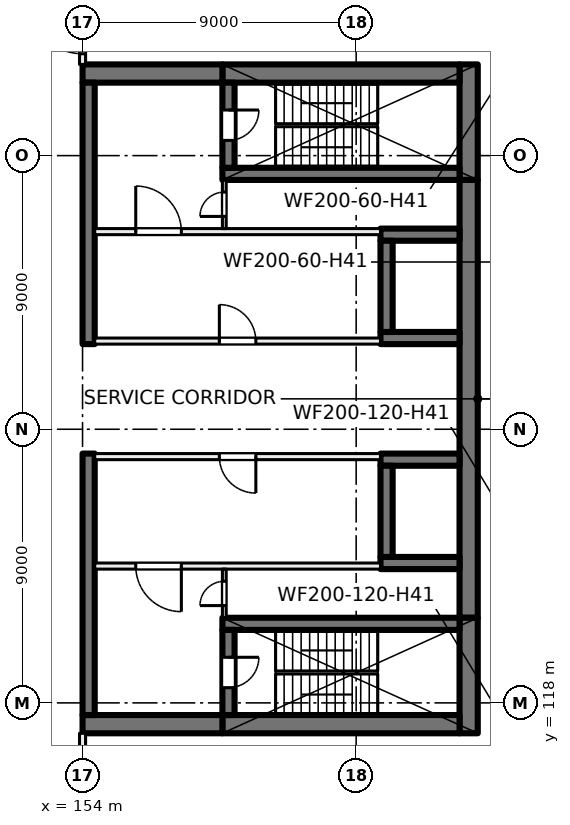
"""IFC4 building model, lengths in metres.
Left out: names, types, materials, properties, quantities, classifications, styles, units other than length and angle.
Written with IfcOpenShell. Run it as: python <this file> out.ifc"""

import sys

from ifc_helpers import new_model, si_unit, direction, frame, frame_2d, origin, place, context, subcontext, project, spatial, rectangle, extrude, element, fill, save


model = new_model("IFC4")
c1 = context("Model", 3, precision=1e-05, world=origin(), true_north=direction((0.0, 1.0)))
c2 = subcontext(c1, "Body", "Model", "MODEL_VIEW")
j1 = project(units=[si_unit("LENGTHUNIT", "METRE"), si_unit("PLANEANGLEUNIT", "RADIAN")], contexts=[c1])
p1 = place(None, origin())
s1 = spatial("IfcSite", under=j1, at=p1, CompositionType="ELEMENT")
p2 = place(p1, origin())
s2 = spatial("IfcBuilding", under=s1, at=p2, CompositionType="ELEMENT")
p3 = place(p2, frame((0.0, 0.0, -4.5)))
s3 = spatial("IfcBuildingStorey", under=s2, at=p3, CompositionType="ELEMENT", Elevation=-4.5)
p4 = place(p3, frame((166.7, 139.0, 0.0), z_axis=(0.0, 0.0, 1.0), x_axis=(0.0, -1.0, 0.0)))
e1 = element("IfcWall", 1, at=p4, inside=s3, PredefinedType="SHEAR", context=c2, shape_type="SweptSolid", body=[
    extrude(rectangle(XDim=3.8, YDim=0.6, at=frame_2d((1.9, 0.0))), origin(), (0.0, 0.0, 1.0), 4.5),
])
p5 = place(p3, frame((166.7, 135.2, 0.0), z_axis=(0.0, 0.0, 1.0), x_axis=(0.0, -1.0, 0.0)))
e2 = element("IfcWall", 2, at=p5, inside=s3, PredefinedType="SHEAR", context=c2, shape_type="SweptSolid", body=[
    extrude(rectangle(XDim=14.4, YDim=0.6, at=frame_2d((7.2, 0.0))), origin(), (0.0, 0.0, 1.0), 4.5),
])
p6 = place(p3, frame((166.7, 120.8, 0.0), z_axis=(0.0, 0.0, 1.0), x_axis=(0.0, -1.0, 0.0)))
e3 = element("IfcWall", 3, at=p6, inside=s3, PredefinedType="SHEAR", context=c2, shape_type="SweptSolid", body=[
    extrude(rectangle(XDim=3.8, YDim=0.6, at=frame_2d((1.9, 0.0))), origin(), (0.0, 0.0, 1.0), 4.5),
])
for number, where, z_axis, x_axis in (
    (4, (166.4, 138.7, 0.0), (0.0, 0.0, 1.0), (-1.0, 0.0, 0.0)),
    (5, (166.4, 117.3, 0.0), (0.0, 0.0, 1.0), (-1.0, 0.0, 0.0)),
):
    element("IfcWall", number, at=place(p3, frame(where, z_axis=z_axis, x_axis=x_axis)), inside=s3, PredefinedType="SHEAR", context=c2, shape_type="SweptSolid", body=[
        extrude(rectangle(XDim=7.8, YDim=0.6, at=frame_2d((3.9, 0.0))), origin(), (0.0, 0.0, 1.0), 4.5),
    ])
for number, where, z_axis, x_axis in (
    (6, (158.6, 138.7, 0.0), (0.0, 0.0, 1.0), (-1.0, 0.0, 0.0)),
    (7, (158.6, 117.3, 0.0), (0.0, 0.0, 1.0), (-1.0, 0.0, 0.0)),
):
    element("IfcWall", number, at=place(p3, frame(where, z_axis=z_axis, x_axis=x_axis)), inside=s3, PredefinedType="SHEAR", context=c2, shape_type="SweptSolid", body=[
        extrude(rectangle(XDim=4.6, YDim=0.6, at=frame_2d((2.3, 0.0))), origin(), (0.0, 0.0, 1.0), 4.5),
    ])
p7 = place(p3, frame((166.4, 135.4, 0.0), z_axis=(0.0, 0.0, 1.0), x_axis=(-1.0, 0.0, 0.0)))
e8 = element("IfcWall", 8, at=p7, inside=s3, PredefinedType="SHEAR", context=c2, shape_type="SweptSolid", body=[
    extrude(rectangle(XDim=7.8, YDim=0.4, at=frame_2d((3.9, 0.0))), origin(), (0.0, 0.0, 1.0), 4.5),
])
p8 = place(p3, frame((158.8, 138.4, 0.0), z_axis=(0.0, 0.0, 1.0), x_axis=(0.0, -1.0, 0.0)))
e9 = element("IfcWall", 9, at=p8, inside=s3, PredefinedType="SHEAR", context=c2, shape_type="SweptSolid", body=[
    extrude(rectangle(XDim=2.8, YDim=0.4, at=frame_2d((1.4, 0.0))), origin(), (0.0, 0.0, 1.0), 4.5),
])
p9 = place(p8, frame((0.9, 0.0, 0.0)))
e10 = element("IfcOpeningElement", 10, at=p9, cuts=e9, PredefinedType="OPENING", context=c2, shape_type="SweptSolid", body=[
    extrude(rectangle(XDim=1.0, YDim=2.1, at=frame_2d((0.5, 1.05))), frame((0.0, 0.21, 0.0), z_axis=(0.0, -1.0, 0.0), x_axis=(1.0, 0.0, 0.0)), (0.0, 0.0, 1.0), 0.42),
])
p10 = place(p3, frame((166.4, 120.6, 0.0), z_axis=(0.0, 0.0, 1.0), x_axis=(-1.0, 0.0, 0.0)))
e11 = element("IfcWall", 11, at=p10, inside=s3, PredefinedType="SHEAR", context=c2, shape_type="SweptSolid", body=[
    extrude(rectangle(XDim=7.8, YDim=0.4, at=frame_2d((3.9, 0.0))), origin(), (0.0, 0.0, 1.0), 4.5),
])
p11 = place(p3, frame((158.8, 120.4, 0.0), z_axis=(0.0, 0.0, 1.0), x_axis=(0.0, -1.0, 0.0)))
e12 = element("IfcWall", 12, at=p11, inside=s3, PredefinedType="SHEAR", context=c2, shape_type="SweptSolid", body=[
    extrude(rectangle(XDim=2.8, YDim=0.4, at=frame_2d((1.4, 0.0))), origin(), (0.0, 0.0, 1.0), 4.5),
])
p12 = place(p11, frame((0.9, 0.0, 0.0)))
e13 = element("IfcOpeningElement", 13, at=p12, cuts=e12, PredefinedType="OPENING", context=c2, shape_type="SweptSolid", body=[
    extrude(rectangle(XDim=1.0, YDim=2.1, at=frame_2d((0.5, 1.05))), frame((0.0, 0.21, 0.0), z_axis=(0.0, -1.0, 0.0), x_axis=(1.0, 0.0, 0.0)), (0.0, 0.0, 1.0), 0.42),
])
for number, where, z_axis, x_axis in (
    (14, (166.4, 130.0, 0.0), (0.0, 0.0, 1.0), (-1.0, 0.0, 0.0)),
    (15, (166.4, 133.4, 0.0), (0.0, 0.0, 1.0), (-1.0, 0.0, 0.0)),
):
    element("IfcWall", number, at=place(p3, frame(where, z_axis=z_axis, x_axis=x_axis)), inside=s3, PredefinedType="SHEAR", context=c2, shape_type="SweptSolid", body=[
        extrude(rectangle(XDim=2.6, YDim=0.4, at=frame_2d((1.3, 0.0))), origin(), (0.0, 0.0, 1.0), 4.5),
    ])
p13 = place(p3, frame((164.0, 133.2, 0.0), z_axis=(0.0, 0.0, 1.0), x_axis=(0.0, -1.0, 0.0)))
e16 = element("IfcWall", 16, at=p13, inside=s3, PredefinedType="SHEAR", context=c2, shape_type="SweptSolid", body=[
    extrude(rectangle(XDim=3.0, YDim=0.4, at=frame_2d((1.5, 0.0))), origin(), (0.0, 0.0, 1.0), 4.5),
])
for number, where, z_axis, x_axis in (
    (17, (166.4, 126.0, 0.0), (0.0, 0.0, 1.0), (-1.0, 0.0, 0.0)),
    (18, (166.4, 122.6, 0.0), (0.0, 0.0, 1.0), (-1.0, 0.0, 0.0)),
):
    element("IfcWall", number, at=place(p3, frame(where, z_axis=z_axis, x_axis=x_axis)), inside=s3, PredefinedType="SHEAR", context=c2, shape_type="SweptSolid", body=[
        extrude(rectangle(XDim=2.6, YDim=0.4, at=frame_2d((1.3, 0.0))), origin(), (0.0, 0.0, 1.0), 4.5),
    ])
p14 = place(p3, frame((164.0, 125.8, 0.0), z_axis=(0.0, 0.0, 1.0), x_axis=(0.0, -1.0, 0.0)))
e19 = element("IfcWall", 19, at=p14, inside=s3, PredefinedType="SHEAR", context=c2, shape_type="SweptSolid", body=[
    extrude(rectangle(XDim=3.0, YDim=0.4, at=frame_2d((1.5, 0.0))), origin(), (0.0, 0.0, 1.0), 4.5),
])
for number, where, z_axis, x_axis in (
    (20, (154.2, 138.4, 0.0), (0.0, 0.0, 1.0), (0.0, -1.0, 0.0)),
    (21, (154.2, 126.2, 0.0), (0.0, 0.0, 1.0), (0.0, -1.0, 0.0)),
):
    element("IfcWall", number, at=place(p3, frame(where, z_axis=z_axis, x_axis=x_axis)), inside=s3, PredefinedType="SHEAR", context=c2, shape_type="SweptSolid", body=[
        extrude(rectangle(XDim=8.6, YDim=0.4, at=frame_2d((4.3, 0.0))), origin(), (0.0, 0.0, 1.0), 4.5),
    ])
p15 = place(p3, frame((163.8, 126.1, 0.0), z_axis=(0.0, 0.0, 1.0), x_axis=(-1.0, 0.0, 0.0)))
e22 = element("IfcWall", 22, at=p15, inside=s3, PredefinedType="PARTITIONING", context=c2, shape_type="SweptSolid", body=[
    extrude(rectangle(XDim=9.4, YDim=0.2, at=frame_2d((4.7, 0.0))), origin(), (0.0, 0.0, 1.0), 4.1),
])
p16 = place(p15, frame((4.1, 0.0, 0.0)))
e23 = element("IfcOpeningElement", 23, at=p16, cuts=e22, PredefinedType="OPENING", context=c2, shape_type="SweptSolid", body=[
    extrude(rectangle(XDim=1.2, YDim=2.1, at=frame_2d((0.6, 1.05))), frame((0.0, 0.11, 0.0), z_axis=(0.0, -1.0, 0.0), x_axis=(1.0, 0.0, 0.0)), (0.0, 0.0, 1.0), 0.22),
])
p17 = place(p3, frame((163.8, 122.5, 0.0), z_axis=(0.0, 0.0, 1.0), x_axis=(-1.0, 0.0, 0.0)))
e24 = element("IfcWall", 24, at=p17, inside=s3, PredefinedType="PARTITIONING", context=c2, shape_type="SweptSolid", body=[
    extrude(rectangle(XDim=9.4, YDim=0.2, at=frame_2d((4.7, 0.0))), origin(), (0.0, 0.0, 1.0), 4.1),
])
p18 = place(p17, frame((6.55, 0.0, 0.0)))
e25 = element("IfcOpeningElement", 25, at=p18, cuts=e24, PredefinedType="OPENING", context=c2, shape_type="SweptSolid", body=[
    extrude(rectangle(XDim=1.5, YDim=2.1, at=frame_2d((0.75, 1.05))), frame((0.0, 0.11, 0.0), z_axis=(0.0, -1.0, 0.0), x_axis=(1.0, 0.0, 0.0)), (0.0, 0.0, 1.0), 0.22),
])
p19 = place(p3, frame((158.663, 120.8, 0.0), z_axis=(0.0, 0.0, 1.0), x_axis=(0.0, 1.0, 0.0)))
e26 = element("IfcWall", 26, at=p19, inside=s3, PredefinedType="PARTITIONING", context=c2, shape_type="SweptSolid", body=[
    extrude(rectangle(XDim=1.6, YDim=0.125, at=frame_2d((0.8, 0.0))), origin(), (0.0, 0.0, 1.0), 4.1),
])
p20 = place(p19, frame((0.4, 0.0, 0.0)))
e27 = element("IfcOpeningElement", 27, at=p20, cuts=e26, PredefinedType="OPENING", context=c2, shape_type="SweptSolid", body=[
    extrude(rectangle(XDim=0.8, YDim=2.1, at=frame_2d((0.4, 1.05))), frame((0.0, 0.073, 0.0), z_axis=(0.0, -1.0, 0.0), x_axis=(1.0, 0.0, 0.0)), (0.0, 0.0, 1.0), 0.145),
])
p21 = place(p3, frame((154.4, 129.9, 0.0), z_axis=(0.0, 0.0, 1.0), x_axis=(1.0, 0.0, 0.0)))
e28 = element("IfcWall", 28, at=p21, inside=s3, PredefinedType="PARTITIONING", context=c2, shape_type="SweptSolid", body=[
    extrude(rectangle(XDim=9.4, YDim=0.2, at=frame_2d((4.7, 0.0))), origin(), (0.0, 0.0, 1.0), 4.1),
])
p22 = place(p21, frame((4.1, 0.0, 0.0)))
e29 = element("IfcOpeningElement", 29, at=p22, cuts=e28, PredefinedType="OPENING", context=c2, shape_type="SweptSolid", body=[
    extrude(rectangle(XDim=1.2, YDim=2.1, at=frame_2d((0.6, 1.05))), frame((0.0, 0.11, 0.0), z_axis=(0.0, -1.0, 0.0), x_axis=(1.0, 0.0, 0.0)), (0.0, 0.0, 1.0), 0.22),
])
p23 = place(p3, frame((154.4, 133.5, 0.0), z_axis=(0.0, 0.0, 1.0), x_axis=(1.0, 0.0, 0.0)))
e30 = element("IfcWall", 30, at=p23, inside=s3, PredefinedType="PARTITIONING", context=c2, shape_type="SweptSolid", body=[
    extrude(rectangle(XDim=9.4, YDim=0.2, at=frame_2d((4.7, 0.0))), origin(), (0.0, 0.0, 1.0), 4.1),
])
p24 = place(p23, frame((1.35, 0.0, 0.0)))
e31 = element("IfcOpeningElement", 31, at=p24, cuts=e30, PredefinedType="OPENING", context=c2, shape_type="SweptSolid", body=[
    extrude(rectangle(XDim=1.5, YDim=2.1, at=frame_2d((0.75, 1.05))), frame((0.0, 0.11, 0.0), z_axis=(0.0, -1.0, 0.0), x_axis=(1.0, 0.0, 0.0)), (0.0, 0.0, 1.0), 0.22),
])
p25 = place(p3, frame((158.663, 133.6, 0.0), z_axis=(0.0, 0.0, 1.0), x_axis=(0.0, 1.0, 0.0)))
e32 = element("IfcWall", 32, at=p25, inside=s3, PredefinedType="PARTITIONING", context=c2, shape_type="SweptSolid", body=[
    extrude(rectangle(XDim=1.6, YDim=0.125, at=frame_2d((0.8, 0.0))), origin(), (0.0, 0.0, 1.0), 4.1),
])
p26 = place(p25, frame((0.4, 0.0, 0.0)))
e33 = element("IfcOpeningElement", 33, at=p26, cuts=e32, PredefinedType="OPENING", context=c2, shape_type="SweptSolid", body=[
    extrude(rectangle(XDim=0.8, YDim=2.1, at=frame_2d((0.4, 1.05))), frame((0.0, 0.073, 0.0), z_axis=(0.0, -1.0, 0.0), x_axis=(1.0, 0.0, 0.0)), (0.0, 0.0, 1.0), 0.145),
])
p27 = place(p3, frame((154.0, 114.5, 0.0), z_axis=(0.0, 0.0, 1.0), x_axis=(0.0, 1.0, 0.0)))
e34 = element("IfcWall", 34, at=p27, inside=s3, PredefinedType="PARTITIONING", context=c2, shape_type="SweptSolid", body=[
    extrude(rectangle(XDim=2.5, YDim=0.2, at=frame_2d((1.25, 0.0))), origin(), (0.0, 0.0, 1.0), 4.1),
])
p28 = place(p3, frame((154.0, 151.9, 0.0), z_axis=(0.0, 0.0, 1.0), x_axis=(0.0, -1.0, 0.0)))
e35 = element("IfcWall", 35, at=p28, inside=s3, PredefinedType="PARTITIONING", context=c2, shape_type="SweptSolid", body=[
    extrude(rectangle(XDim=12.9, YDim=0.2, at=frame_2d((6.45, 0.0))), origin(), (0.0, 0.0, 1.0), 4.1),
])
p29 = place(p28, frame((10.75, 0.0, 0.0)))
e36 = element("IfcOpeningElement", 36, at=p29, cuts=e35, PredefinedType="OPENING", context=c2, shape_type="SweptSolid", body=[
    extrude(rectangle(XDim=1.8, YDim=2.1, at=frame_2d((0.9, 1.05))), frame((0.0, 0.11, 0.0), z_axis=(0.0, -1.0, 0.0), x_axis=(1.0, 0.0, 0.0)), (0.0, 0.0, 1.0), 0.22),
])
p30 = place(p16, origin())
e37 = element("IfcDoor", 37, at=p30, inside=s3, OperationType="DOUBLE_DOOR_SINGLE_SWING", PredefinedType="DOOR", context=c2, shape_type="SweptSolid", body=[
    extrude(rectangle(XDim=1.2, YDim=2.1, at=frame_2d((0.6, 1.05))), frame((0.0, 0.025, 0.0), z_axis=(0.0, -1.0, 0.0), x_axis=(1.0, 0.0, 0.0)), (0.0, 0.0, 1.0), 0.05),
])
fill(e23, e37)
p31 = place(p18, origin())
e38 = element("IfcDoor", 38, at=p31, inside=s3, OperationType="DOUBLE_DOOR_SINGLE_SWING", PredefinedType="DOOR", context=c2, shape_type="SweptSolid", body=[
    extrude(rectangle(XDim=1.5, YDim=2.1, at=frame_2d((0.75, 1.05))), frame((0.0, 0.025, 0.0), z_axis=(0.0, -1.0, 0.0), x_axis=(1.0, 0.0, 0.0)), (0.0, 0.0, 1.0), 0.05),
])
fill(e25, e38)
p32 = place(p12, origin())
e39 = element("IfcDoor", 39, at=p32, inside=s3, OperationType="SINGLE_SWING_LEFT", PredefinedType="DOOR", context=c2, shape_type="SweptSolid", body=[
    extrude(rectangle(XDim=1.0, YDim=2.1, at=frame_2d((0.5, 1.05))), frame((0.0, 0.025, 0.0), z_axis=(0.0, -1.0, 0.0), x_axis=(1.0, 0.0, 0.0)), (0.0, 0.0, 1.0), 0.05),
])
fill(e13, e39)
p33 = place(p20, origin())
e40 = element("IfcDoor", 40, at=p33, inside=s3, OperationType="SINGLE_SWING_RIGHT", PredefinedType="DOOR", context=c2, shape_type="SweptSolid", body=[
    extrude(rectangle(XDim=0.8, YDim=2.1, at=frame_2d((0.4, 1.05))), frame((0.0, 0.025, 0.0), z_axis=(0.0, -1.0, 0.0), x_axis=(1.0, 0.0, 0.0)), (0.0, 0.0, 1.0), 0.05),
])
fill(e27, e40)
p34 = place(p22, origin())
e41 = element("IfcDoor", 41, at=p34, inside=s3, OperationType="DOUBLE_DOOR_SINGLE_SWING", PredefinedType="DOOR", context=c2, shape_type="SweptSolid", body=[
    extrude(rectangle(XDim=1.2, YDim=2.1, at=frame_2d((0.6, 1.05))), frame((0.0, 0.025, 0.0), z_axis=(0.0, -1.0, 0.0), x_axis=(1.0, 0.0, 0.0)), (0.0, 0.0, 1.0), 0.05),
])
fill(e29, e41)
p35 = place(p24, origin())
e42 = element("IfcDoor", 42, at=p35, inside=s3, OperationType="DOUBLE_DOOR_SINGLE_SWING", PredefinedType="DOOR", context=c2, shape_type="SweptSolid", body=[
    extrude(rectangle(XDim=1.5, YDim=2.1, at=frame_2d((0.75, 1.05))), frame((0.0, 0.025, 0.0), z_axis=(0.0, -1.0, 0.0), x_axis=(1.0, 0.0, 0.0)), (0.0, 0.0, 1.0), 0.05),
])
fill(e31, e42)
p36 = place(p9, origin())
e43 = element("IfcDoor", 43, at=p36, inside=s3, OperationType="SINGLE_SWING_RIGHT", PredefinedType="DOOR", context=c2, shape_type="SweptSolid", body=[
    extrude(rectangle(XDim=1.0, YDim=2.1, at=frame_2d((0.5, 1.05))), frame((0.0, 0.025, 0.0), z_axis=(0.0, -1.0, 0.0), x_axis=(1.0, 0.0, 0.0)), (0.0, 0.0, 1.0), 0.05),
])
fill(e10, e43)
p37 = place(p26, origin())
e44 = element("IfcDoor", 44, at=p37, inside=s3, OperationType="SINGLE_SWING_LEFT", PredefinedType="DOOR", context=c2, shape_type="SweptSolid", body=[
    extrude(rectangle(XDim=0.8, YDim=2.1, at=frame_2d((0.4, 1.05))), frame((0.0, 0.025, 0.0), z_axis=(0.0, -1.0, 0.0), x_axis=(1.0, 0.0, 0.0)), (0.0, 0.0, 1.0), 0.05),
])
fill(e33, e44)
p38 = place(p29, origin())
e45 = element("IfcDoor", 45, at=p38, inside=s3, OperationType="DOUBLE_DOOR_SINGLE_SWING", PredefinedType="DOOR", context=c2, shape_type="SweptSolid", body=[
    extrude(rectangle(XDim=1.8, YDim=2.1, at=frame_2d((0.9, 1.05))), frame((0.0, 0.025, 0.0), z_axis=(0.0, -1.0, 0.0), x_axis=(1.0, 0.0, 0.0)), (0.0, 0.0, 1.0), 0.05),
])
fill(e36, e45)
save(model, sys.argv[1])
